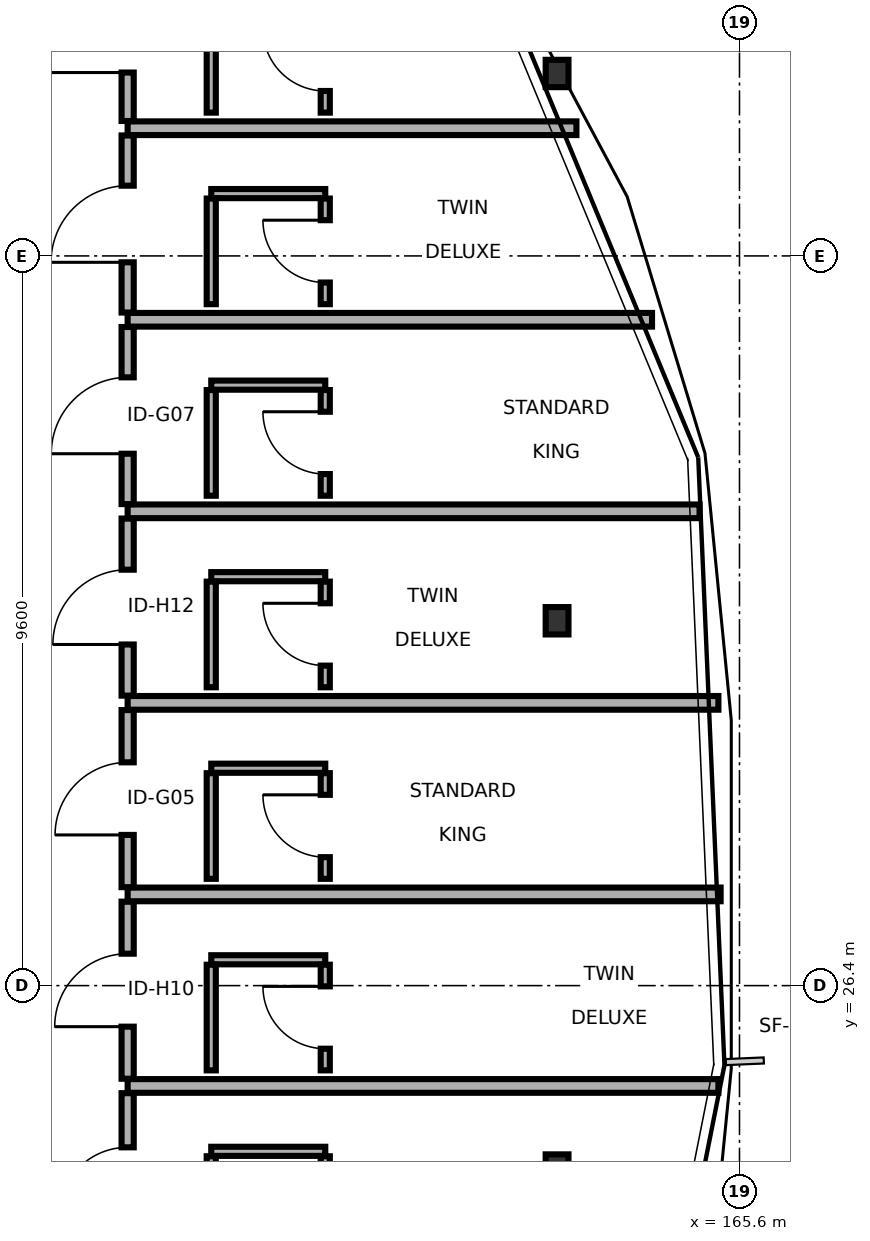
"""IFC4 building model, lengths in metres.
Left out: names, types, materials, properties, quantities, classifications, styles, units other than length and angle.
Written with IfcOpenShell. Run it as: python <this file> out.ifc"""

import sys

from ifc_helpers import new_model, si_unit, direction, frame, frame_2d, origin, origin_2d, place, context, subcontext, project, spatial, rectangle, i_section, extrude, element, fill, save


model = new_model("IFC4")
c1 = context("Model", 3, precision=1e-05, world=origin(), true_north=direction((0.0, 1.0)))
c2 = subcontext(c1, "Body", "Model", "MODEL_VIEW")
j1 = project(units=[si_unit("LENGTHUNIT", "METRE"), si_unit("PLANEANGLEUNIT", "RADIAN")], contexts=[c1])
p1 = place(None, origin())
s1 = spatial("IfcSite", under=j1, at=p1, CompositionType="ELEMENT")
p2 = place(p1, origin())
s2 = spatial("IfcBuilding", under=s1, at=p2, CompositionType="ELEMENT")
p3 = place(p2, frame((0.0, 0.0, 35.1)))
s3 = spatial("IfcBuildingStorey", under=s2, at=p3, CompositionType="ELEMENT", Elevation=35.1)
for number, where, z_axis, x_axis in (
    (1, (163.2, 24.0, 0.0), (0.0, 0.0, 1.0), (1.0, 0.0, 0.0)),
    (2, (163.2, 31.2, 0.0), (0.0, 0.0, 1.0), (1.0, 0.0, 0.0)),
    (3, (163.2, 38.4, 0.0), (0.0, 0.0, 1.0), (1.0, 0.0, 0.0)),
):
    element("IfcColumn", number, at=place(p3, frame(where, z_axis=z_axis, x_axis=x_axis)), inside=s3, PredefinedType="COLUMN", context=c2, shape_type="SweptSolid", body=[
        extrude(i_section(OverallWidth=0.3, OverallDepth=0.36, WebThickness=0.012, FlangeThickness=0.022, FilletRadius=0.027, at=origin_2d()), origin(), (0.0, 0.0, 1.0), 3.4),
    ])
p4 = place(p3, frame((157.55, 22.655, 0.0), z_axis=(0.0, 0.0, 1.0), x_axis=(0.0, 1.0, 0.0)))
e4 = element("IfcWall", 4, at=p4, inside=s3, PredefinedType="PARTITIONING", context=c2, shape_type="SweptSolid", body=[
    extrude(rectangle(XDim=2.33, YDim=0.16, at=frame_2d((1.165, 0.0))), origin(), (0.0, 0.0, 1.0), 2.75),
])
p5 = place(p4, frame((0.712, 0.0, 0.0)))
e5 = element("IfcOpeningElement", 5, at=p5, cuts=e4, PredefinedType="OPENING", context=c2, shape_type="SweptSolid", body=[
    extrude(rectangle(XDim=0.905, YDim=2.05, at=frame_2d((0.453, 1.025))), frame((0.0, 0.09, 0.0), z_axis=(0.0, -1.0, 0.0), x_axis=(1.0, 0.0, 0.0)), (0.0, 0.0, 1.0), 0.18),
])
p6 = place(p3, frame((158.65, 24.22, 0.0), z_axis=(0.0, 0.0, 1.0), x_axis=(1.0, 0.0, 0.0)))
e6 = element("IfcWall", 6, at=p6, inside=s3, PredefinedType="PARTITIONING", context=c2, shape_type="SweptSolid", body=[
    extrude(rectangle(XDim=1.5, YDim=0.12, at=frame_2d((0.75, 0.0))), origin(), (0.0, 0.0, 1.0), 2.75),
])
p7 = place(p3, frame((158.65, 22.765, 0.0), z_axis=(0.0, 0.0, 1.0), x_axis=(0.0, 1.0, 0.0)))
e7 = element("IfcWall", 7, at=p7, inside=s3, PredefinedType="PARTITIONING", context=c2, shape_type="SweptSolid", body=[
    extrude(rectangle(XDim=1.39, YDim=0.12, at=frame_2d((0.695, 0.0))), origin(), (0.0, 0.0, 1.0), 2.75),
])
p8 = place(p3, frame((160.15, 22.765, 0.0), z_axis=(0.0, 0.0, 1.0), x_axis=(0.0, 1.0, 0.0)))
e8 = element("IfcWall", 8, at=p8, inside=s3, PredefinedType="PARTITIONING", context=c2, shape_type="SweptSolid", body=[
    extrude(rectangle(XDim=1.39, YDim=0.12, at=frame_2d((0.695, 0.0))), origin(), (0.0, 0.0, 1.0), 2.75),
])
p9 = place(p8, frame((0.285, 0.0, 0.0)))
e9 = element("IfcOpeningElement", 9, at=p9, cuts=e8, PredefinedType="OPENING", context=c2, shape_type="SweptSolid", body=[
    extrude(rectangle(XDim=0.82, YDim=2.08, at=frame_2d((0.41, 1.04))), frame((0.0, 0.07, 0.0), z_axis=(0.0, -1.0, 0.0), x_axis=(1.0, 0.0, 0.0)), (0.0, 0.0, 1.0), 0.14),
])
p10 = place(p3, frame((157.55, 25.08, 0.0), z_axis=(0.0, 0.0, 1.0), x_axis=(1.0, 0.0, 0.0)))
e10 = element("IfcWall", 10, at=p10, inside=s3, PredefinedType="PARTITIONING", context=c2, shape_type="SweptSolid", body=[
    extrude(rectangle(XDim=7.773, YDim=0.18, at=frame_2d((3.886, 0.0))), origin(), (0.0, 0.0, 1.0), 2.65),
])
p11 = place(p3, frame((157.55, 25.175, 0.0), z_axis=(0.0, 0.0, 1.0), x_axis=(0.0, 1.0, 0.0)))
e11 = element("IfcWall", 11, at=p11, inside=s3, PredefinedType="PARTITIONING", context=c2, shape_type="SweptSolid", body=[
    extrude(rectangle(XDim=2.33, YDim=0.16, at=frame_2d((1.165, 0.0))), origin(), (0.0, 0.0, 1.0), 3.165),
])
p12 = place(p11, frame((0.685, 0.0, 0.0)))
e12 = element("IfcOpeningElement", 12, at=p12, cuts=e11, PredefinedType="OPENING", context=c2, shape_type="SweptSolid", body=[
    extrude(rectangle(XDim=0.96, YDim=2.13, at=frame_2d((0.48, 1.065))), frame((0.0, 0.09, 0.0), z_axis=(0.0, -1.0, 0.0), x_axis=(1.0, 0.0, 0.0)), (0.0, 0.0, 1.0), 0.18),
])
p13 = place(p3, frame((158.65, 26.74, 0.0), z_axis=(0.0, 0.0, 1.0), x_axis=(1.0, 0.0, 0.0)))
e13 = element("IfcWall", 13, at=p13, inside=s3, PredefinedType="PARTITIONING", context=c2, shape_type="SweptSolid", body=[
    extrude(rectangle(XDim=1.5, YDim=0.12, at=frame_2d((0.75, 0.0))), origin(), (0.0, 0.0, 1.0), 3.165),
])
p14 = place(p3, frame((158.65, 25.285, 0.0), z_axis=(0.0, 0.0, 1.0), x_axis=(0.0, 1.0, 0.0)))
e14 = element("IfcWall", 14, at=p14, inside=s3, PredefinedType="PARTITIONING", context=c2, shape_type="SweptSolid", body=[
    extrude(rectangle(XDim=1.39, YDim=0.12, at=frame_2d((0.695, 0.0))), origin(), (0.0, 0.0, 1.0), 3.165),
])
p15 = place(p3, frame((160.15, 25.285, 0.0), z_axis=(0.0, 0.0, 1.0), x_axis=(0.0, 1.0, 0.0)))
e15 = element("IfcWall", 15, at=p15, inside=s3, PredefinedType="PARTITIONING", context=c2, shape_type="SweptSolid", body=[
    extrude(rectangle(XDim=1.39, YDim=0.12, at=frame_2d((0.695, 0.0))), origin(), (0.0, 0.0, 1.0), 3.165),
])
p16 = place(p15, frame((0.285, 0.0, 0.0)))
e16 = element("IfcOpeningElement", 16, at=p16, cuts=e15, PredefinedType="OPENING", context=c2, shape_type="SweptSolid", body=[
    extrude(rectangle(XDim=0.82, YDim=2.08, at=frame_2d((0.41, 1.04))), frame((0.0, 0.07, 0.0), z_axis=(0.0, -1.0, 0.0), x_axis=(1.0, 0.0, 0.0)), (0.0, 0.0, 1.0), 0.14),
])
p17 = place(p3, frame((157.55, 27.6, 0.0), z_axis=(0.0, 0.0, 1.0), x_axis=(1.0, 0.0, 0.0)))
e17 = element("IfcWall", 17, at=p17, inside=s3, PredefinedType="PARTITIONING", context=c2, shape_type="SweptSolid", body=[
    extrude(rectangle(XDim=7.802, YDim=0.18, at=frame_2d((3.901, 0.0))), origin(), (0.0, 0.0, 1.0), 2.65),
])
p18 = place(p3, frame((157.55, 27.695, 0.0), z_axis=(0.0, 0.0, 1.0), x_axis=(0.0, 1.0, 0.0)))
e18 = element("IfcWall", 18, at=p18, inside=s3, PredefinedType="PARTITIONING", context=c2, shape_type="SweptSolid", body=[
    extrude(rectangle(XDim=2.33, YDim=0.16, at=frame_2d((1.165, 0.0))), origin(), (0.0, 0.0, 1.0), 3.165),
])
p19 = place(p18, frame((0.688, 0.0, 0.0)))
e19 = element("IfcOpeningElement", 19, at=p19, cuts=e18, PredefinedType="OPENING", context=c2, shape_type="SweptSolid", body=[
    extrude(rectangle(XDim=0.955, YDim=2.05, at=frame_2d((0.478, 1.025))), frame((0.0, 0.09, 0.0), z_axis=(0.0, -1.0, 0.0), x_axis=(1.0, 0.0, 0.0)), (0.0, 0.0, 1.0), 0.18),
])
p20 = place(p3, frame((158.65, 29.26, 0.0), z_axis=(0.0, 0.0, 1.0), x_axis=(1.0, 0.0, 0.0)))
e20 = element("IfcWall", 20, at=p20, inside=s3, PredefinedType="PARTITIONING", context=c2, shape_type="SweptSolid", body=[
    extrude(rectangle(XDim=1.5, YDim=0.12, at=frame_2d((0.75, 0.0))), origin(), (0.0, 0.0, 1.0), 3.165),
])
p21 = place(p3, frame((158.65, 27.805, 0.0), z_axis=(0.0, 0.0, 1.0), x_axis=(0.0, 1.0, 0.0)))
e21 = element("IfcWall", 21, at=p21, inside=s3, PredefinedType="PARTITIONING", context=c2, shape_type="SweptSolid", body=[
    extrude(rectangle(XDim=1.39, YDim=0.12, at=frame_2d((0.695, 0.0))), origin(), (0.0, 0.0, 1.0), 3.165),
])
p22 = place(p3, frame((160.15, 27.805, 0.0), z_axis=(0.0, 0.0, 1.0), x_axis=(0.0, 1.0, 0.0)))
e22 = element("IfcWall", 22, at=p22, inside=s3, PredefinedType="PARTITIONING", context=c2, shape_type="SweptSolid", body=[
    extrude(rectangle(XDim=1.39, YDim=0.12, at=frame_2d((0.695, 0.0))), origin(), (0.0, 0.0, 1.0), 3.165),
])
p23 = place(p22, frame((0.285, 0.0, 0.0)))
e23 = element("IfcOpeningElement", 23, at=p23, cuts=e22, PredefinedType="OPENING", context=c2, shape_type="SweptSolid", body=[
    extrude(rectangle(XDim=0.82, YDim=2.08, at=frame_2d((0.41, 1.04))), frame((0.0, 0.07, 0.0), z_axis=(0.0, -1.0, 0.0), x_axis=(1.0, 0.0, 0.0)), (0.0, 0.0, 1.0), 0.14),
])
p24 = place(p3, frame((157.55, 30.12, 0.0), z_axis=(0.0, 0.0, 1.0), x_axis=(1.0, 0.0, 0.0)))
e24 = element("IfcWall", 24, at=p24, inside=s3, PredefinedType="PARTITIONING", context=c2, shape_type="SweptSolid", body=[
    extrude(rectangle(XDim=7.773, YDim=0.18, at=frame_2d((3.886, 0.0))), origin(), (0.0, 0.0, 1.0), 2.65),
])
p25 = place(p3, frame((157.55, 30.215, 0.0), z_axis=(0.0, 0.0, 1.0), x_axis=(0.0, 1.0, 0.0)))
e25 = element("IfcWall", 25, at=p25, inside=s3, PredefinedType="PARTITIONING", context=c2, shape_type="SweptSolid", body=[
    extrude(rectangle(XDim=2.33, YDim=0.16, at=frame_2d((1.165, 0.0))), origin(), (0.0, 0.0, 1.0), 2.75),
])
p26 = place(p25, frame((0.673, 0.0, 0.0)))
e26 = element("IfcOpeningElement", 26, at=p26, cuts=e25, PredefinedType="OPENING", context=c2, shape_type="SweptSolid", body=[
    extrude(rectangle(XDim=0.984, YDim=2.07, at=frame_2d((0.492, 1.035))), frame((0.0, 0.09, 0.0), z_axis=(0.0, -1.0, 0.0), x_axis=(1.0, 0.0, 0.0)), (0.0, 0.0, 1.0), 0.18),
])
p27 = place(p3, frame((158.65, 31.78, 0.0), z_axis=(0.0, 0.0, 1.0), x_axis=(1.0, 0.0, 0.0)))
e27 = element("IfcWall", 27, at=p27, inside=s3, PredefinedType="PARTITIONING", context=c2, shape_type="SweptSolid", body=[
    extrude(rectangle(XDim=1.5, YDim=0.12, at=frame_2d((0.75, 0.0))), origin(), (0.0, 0.0, 1.0), 3.165),
])
p28 = place(p3, frame((158.65, 30.325, 0.0), z_axis=(0.0, 0.0, 1.0), x_axis=(0.0, 1.0, 0.0)))
e28 = element("IfcWall", 28, at=p28, inside=s3, PredefinedType="PARTITIONING", context=c2, shape_type="SweptSolid", body=[
    extrude(rectangle(XDim=1.39, YDim=0.12, at=frame_2d((0.695, 0.0))), origin(), (0.0, 0.0, 1.0), 2.75),
])
p29 = place(p3, frame((160.15, 30.325, 0.0), z_axis=(0.0, 0.0, 1.0), x_axis=(0.0, 1.0, 0.0)))
e29 = element("IfcWall", 29, at=p29, inside=s3, PredefinedType="PARTITIONING", context=c2, shape_type="SweptSolid", body=[
    extrude(rectangle(XDim=1.39, YDim=0.12, at=frame_2d((0.695, 0.0))), origin(), (0.0, 0.0, 1.0), 2.75),
])
p30 = place(p29, frame((0.285, 0.0, 0.0)))
e30 = element("IfcOpeningElement", 30, at=p30, cuts=e29, PredefinedType="OPENING", context=c2, shape_type="SweptSolid", body=[
    extrude(rectangle(XDim=0.82, YDim=2.08, at=frame_2d((0.41, 1.04))), frame((0.0, 0.07, 0.0), z_axis=(0.0, -1.0, 0.0), x_axis=(1.0, 0.0, 0.0)), (0.0, 0.0, 1.0), 0.14),
])
p31 = place(p3, frame((157.55, 32.64, 0.0), z_axis=(0.0, 0.0, 1.0), x_axis=(1.0, 0.0, 0.0)))
e31 = element("IfcWall", 31, at=p31, inside=s3, PredefinedType="PARTITIONING", context=c2, shape_type="SweptSolid", body=[
    extrude(rectangle(XDim=7.524, YDim=0.18, at=frame_2d((3.762, 0.0))), origin(), (0.0, 0.0, 1.0), 2.65),
])
p32 = place(p3, frame((157.55, 32.735, 0.0), z_axis=(0.0, 0.0, 1.0), x_axis=(0.0, 1.0, 0.0)))
e32 = element("IfcWall", 32, at=p32, inside=s3, PredefinedType="PARTITIONING", context=c2, shape_type="SweptSolid", body=[
    extrude(rectangle(XDim=2.33, YDim=0.16, at=frame_2d((1.165, 0.0))), origin(), (0.0, 0.0, 1.0), 3.165),
])
p33 = place(p32, frame((0.663, 0.0, 0.0)))
e33 = element("IfcOpeningElement", 33, at=p33, cuts=e32, PredefinedType="OPENING", context=c2, shape_type="SweptSolid", body=[
    extrude(rectangle(XDim=1.005, YDim=2.05, at=frame_2d((0.502, 1.025))), frame((0.0, 0.09, 0.0), z_axis=(0.0, -1.0, 0.0), x_axis=(1.0, 0.0, 0.0)), (0.0, 0.0, 1.0), 0.18),
])
p34 = place(p3, frame((158.65, 34.3, 0.0), z_axis=(0.0, 0.0, 1.0), x_axis=(1.0, 0.0, 0.0)))
e34 = element("IfcWall", 34, at=p34, inside=s3, PredefinedType="PARTITIONING", context=c2, shape_type="SweptSolid", body=[
    extrude(rectangle(XDim=1.5, YDim=0.12, at=frame_2d((0.75, 0.0))), origin(), (0.0, 0.0, 1.0), 3.165),
])
p35 = place(p3, frame((158.65, 32.845, 0.0), z_axis=(0.0, 0.0, 1.0), x_axis=(0.0, 1.0, 0.0)))
e35 = element("IfcWall", 35, at=p35, inside=s3, PredefinedType="PARTITIONING", context=c2, shape_type="SweptSolid", body=[
    extrude(rectangle(XDim=1.39, YDim=0.12, at=frame_2d((0.695, 0.0))), origin(), (0.0, 0.0, 1.0), 3.165),
])
p36 = place(p3, frame((160.15, 32.845, 0.0), z_axis=(0.0, 0.0, 1.0), x_axis=(0.0, 1.0, 0.0)))
e36 = element("IfcWall", 36, at=p36, inside=s3, PredefinedType="PARTITIONING", context=c2, shape_type="SweptSolid", body=[
    extrude(rectangle(XDim=1.39, YDim=0.12, at=frame_2d((0.695, 0.0))), origin(), (0.0, 0.0, 1.0), 3.165),
])
p37 = place(p36, frame((0.285, 0.0, 0.0)))
e37 = element("IfcOpeningElement", 37, at=p37, cuts=e36, PredefinedType="OPENING", context=c2, shape_type="SweptSolid", body=[
    extrude(rectangle(XDim=0.82, YDim=2.08, at=frame_2d((0.41, 1.04))), frame((0.0, 0.07, 0.0), z_axis=(0.0, -1.0, 0.0), x_axis=(1.0, 0.0, 0.0)), (0.0, 0.0, 1.0), 0.14),
])
p38 = place(p3, frame((157.55, 35.16, 0.0), z_axis=(0.0, 0.0, 1.0), x_axis=(1.0, 0.0, 0.0)))
e38 = element("IfcWall", 38, at=p38, inside=s3, PredefinedType="PARTITIONING", context=c2, shape_type="SweptSolid", body=[
    extrude(rectangle(XDim=6.899, YDim=0.18, at=frame_2d((3.45, 0.0))), origin(), (0.0, 0.0, 1.0), 2.65),
])
p39 = place(p3, frame((157.55, 35.255, 0.0), z_axis=(0.0, 0.0, 1.0), x_axis=(0.0, 1.0, 0.0)))
e39 = element("IfcWall", 39, at=p39, inside=s3, PredefinedType="PARTITIONING", context=c2, shape_type="SweptSolid", body=[
    extrude(rectangle(XDim=2.33, YDim=0.16, at=frame_2d((1.165, 0.0))), origin(), (0.0, 0.0, 1.0), 3.165),
])
p40 = place(p39, frame((0.661, 0.0, 0.0)))
e40 = element("IfcOpeningElement", 40, at=p40, cuts=e39, PredefinedType="OPENING", context=c2, shape_type="SweptSolid", body=[
    extrude(rectangle(XDim=1.008, YDim=2.13, at=frame_2d((0.504, 1.065))), frame((0.0, 0.09, 0.0), z_axis=(0.0, -1.0, 0.0), x_axis=(1.0, 0.0, 0.0)), (0.0, 0.0, 1.0), 0.18),
])
p41 = place(p3, frame((158.65, 36.82, 0.0), z_axis=(0.0, 0.0, 1.0), x_axis=(1.0, 0.0, 0.0)))
e41 = element("IfcWall", 41, at=p41, inside=s3, PredefinedType="PARTITIONING", context=c2, shape_type="SweptSolid", body=[
    extrude(rectangle(XDim=1.5, YDim=0.12, at=frame_2d((0.75, 0.0))), origin(), (0.0, 0.0, 1.0), 3.165),
])
p42 = place(p3, frame((158.65, 35.365, 0.0), z_axis=(0.0, 0.0, 1.0), x_axis=(0.0, 1.0, 0.0)))
e42 = element("IfcWall", 42, at=p42, inside=s3, PredefinedType="PARTITIONING", context=c2, shape_type="SweptSolid", body=[
    extrude(rectangle(XDim=1.39, YDim=0.12, at=frame_2d((0.695, 0.0))), origin(), (0.0, 0.0, 1.0), 3.165),
])
p43 = place(p3, frame((160.15, 35.365, 0.0), z_axis=(0.0, 0.0, 1.0), x_axis=(0.0, 1.0, 0.0)))
e43 = element("IfcWall", 43, at=p43, inside=s3, PredefinedType="PARTITIONING", context=c2, shape_type="SweptSolid", body=[
    extrude(rectangle(XDim=1.39, YDim=0.12, at=frame_2d((0.695, 0.0))), origin(), (0.0, 0.0, 1.0), 3.165),
])
p44 = place(p43, frame((0.285, 0.0, 0.0)))
e44 = element("IfcOpeningElement", 44, at=p44, cuts=e43, PredefinedType="OPENING", context=c2, shape_type="SweptSolid", body=[
    extrude(rectangle(XDim=0.82, YDim=2.08, at=frame_2d((0.41, 1.04))), frame((0.0, 0.07, 0.0), z_axis=(0.0, -1.0, 0.0), x_axis=(1.0, 0.0, 0.0)), (0.0, 0.0, 1.0), 0.14),
])
p45 = place(p3, frame((157.55, 37.68, 0.0), z_axis=(0.0, 0.0, 1.0), x_axis=(1.0, 0.0, 0.0)))
e45 = element("IfcWall", 45, at=p45, inside=s3, PredefinedType="PARTITIONING", context=c2, shape_type="SweptSolid", body=[
    extrude(rectangle(XDim=5.905, YDim=0.18, at=frame_2d((2.952, 0.0))), origin(), (0.0, 0.0, 1.0), 2.65),
])
p46 = place(p3, frame((157.55, 37.775, 0.0), z_axis=(0.0, 0.0, 1.0), x_axis=(0.0, 1.0, 0.0)))
e46 = element("IfcWall", 46, at=p46, inside=s3, PredefinedType="PARTITIONING", context=c2, shape_type="SweptSolid", body=[
    extrude(rectangle(XDim=2.33, YDim=0.16, at=frame_2d((1.165, 0.0))), origin(), (0.0, 0.0, 1.0), 2.75),
])
p47 = place(p46, frame((0.637, 0.0, 0.0)))
e47 = element("IfcOpeningElement", 47, at=p47, cuts=e46, PredefinedType="OPENING", context=c2, shape_type="SweptSolid", body=[
    extrude(rectangle(XDim=1.055, YDim=2.05, at=frame_2d((0.527, 1.025))), frame((0.0, 0.09, 0.0), z_axis=(0.0, -1.0, 0.0), x_axis=(1.0, 0.0, 0.0)), (0.0, 0.0, 1.0), 0.18),
])
p48 = place(p3, frame((158.65, 37.885, 0.0), z_axis=(0.0, 0.0, 1.0), x_axis=(0.0, 1.0, 0.0)))
e48 = element("IfcWall", 48, at=p48, inside=s3, PredefinedType="PARTITIONING", context=c2, shape_type="SweptSolid", body=[
    extrude(rectangle(XDim=1.39, YDim=0.12, at=frame_2d((0.695, 0.0))), origin(), (0.0, 0.0, 1.0), 2.75),
])
p49 = place(p3, frame((160.15, 37.885, 0.0), z_axis=(0.0, 0.0, 1.0), x_axis=(0.0, 1.0, 0.0)))
e49 = element("IfcWall", 49, at=p49, inside=s3, PredefinedType="PARTITIONING", context=c2, shape_type="SweptSolid", body=[
    extrude(rectangle(XDim=1.39, YDim=0.12, at=frame_2d((0.695, 0.0))), origin(), (0.0, 0.0, 1.0), 2.75),
])
p50 = place(p49, frame((0.285, 0.0, 0.0)))
e50 = element("IfcOpeningElement", 50, at=p50, cuts=e49, PredefinedType="OPENING", context=c2, shape_type="SweptSolid", body=[
    extrude(rectangle(XDim=0.82, YDim=2.08, at=frame_2d((0.41, 1.04))), frame((0.0, 0.07, 0.0), z_axis=(0.0, -1.0, 0.0), x_axis=(1.0, 0.0, 0.0)), (0.0, 0.0, 1.0), 0.14),
])
p51 = place(p5, origin())
e51 = element("IfcDoor", 51, at=p51, inside=s3, OperationType="SINGLE_SWING_LEFT", PredefinedType="DOOR", context=c2, shape_type="SweptSolid", body=[
    extrude(rectangle(XDim=0.905, YDim=2.05, at=frame_2d((0.453, 1.025))), frame((0.0, 0.025, 0.0), z_axis=(0.0, -1.0, 0.0), x_axis=(1.0, 0.0, 0.0)), (0.0, 0.0, 1.0), 0.05),
])
fill(e5, e51)
p52 = place(p12, origin())
e52 = element("IfcDoor", 52, at=p52, inside=s3, OperationType="SINGLE_SWING_LEFT", PredefinedType="DOOR", context=c2, shape_type="SweptSolid", body=[
    extrude(rectangle(XDim=0.96, YDim=2.13, at=frame_2d((0.48, 1.065))), frame((0.0, 0.025, 0.0), z_axis=(0.0, -1.0, 0.0), x_axis=(1.0, 0.0, 0.0)), (0.0, 0.0, 1.0), 0.05),
])
fill(e12, e52)
p53 = place(p16, origin())
e53 = element("IfcDoor", 53, at=p53, inside=s3, OperationType="SINGLE_SWING_RIGHT", PredefinedType="DOOR", context=c2, shape_type="SweptSolid", body=[
    extrude(rectangle(XDim=0.82, YDim=2.08, at=frame_2d((0.41, 1.04))), frame((0.0, 0.025, 0.0), z_axis=(0.0, -1.0, 0.0), x_axis=(1.0, 0.0, 0.0)), (0.0, 0.0, 1.0), 0.05),
])
fill(e16, e53)
p54 = place(p19, origin())
e54 = element("IfcDoor", 54, at=p54, inside=s3, OperationType="SINGLE_SWING_LEFT", PredefinedType="DOOR", context=c2, shape_type="SweptSolid", body=[
    extrude(rectangle(XDim=0.955, YDim=2.05, at=frame_2d((0.478, 1.025))), frame((0.0, 0.025, 0.0), z_axis=(0.0, -1.0, 0.0), x_axis=(1.0, 0.0, 0.0)), (0.0, 0.0, 1.0), 0.05),
])
fill(e19, e54)
p55 = place(p23, origin())
e55 = element("IfcDoor", 55, at=p55, inside=s3, OperationType="SINGLE_SWING_RIGHT", PredefinedType="DOOR", context=c2, shape_type="SweptSolid", body=[
    extrude(rectangle(XDim=0.82, YDim=2.08, at=frame_2d((0.41, 1.04))), frame((0.0, 0.025, 0.0), z_axis=(0.0, -1.0, 0.0), x_axis=(1.0, 0.0, 0.0)), (0.0, 0.0, 1.0), 0.05),
])
fill(e23, e55)
p56 = place(p26, origin())
e56 = element("IfcDoor", 56, at=p56, inside=s3, OperationType="SINGLE_SWING_LEFT", PredefinedType="DOOR", context=c2, shape_type="SweptSolid", body=[
    extrude(rectangle(XDim=0.984, YDim=2.07, at=frame_2d((0.492, 1.035))), frame((0.0, 0.025, 0.0), z_axis=(0.0, -1.0, 0.0), x_axis=(1.0, 0.0, 0.0)), (0.0, 0.0, 1.0), 0.05),
])
fill(e26, e56)
p57 = place(p30, origin())
e57 = element("IfcDoor", 57, at=p57, inside=s3, OperationType="SINGLE_SWING_RIGHT", PredefinedType="DOOR", context=c2, shape_type="SweptSolid", body=[
    extrude(rectangle(XDim=0.82, YDim=2.08, at=frame_2d((0.41, 1.04))), frame((0.0, 0.025, 0.0), z_axis=(0.0, -1.0, 0.0), x_axis=(1.0, 0.0, 0.0)), (0.0, 0.0, 1.0), 0.05),
])
fill(e30, e57)
p58 = place(p33, origin())
e58 = element("IfcDoor", 58, at=p58, inside=s3, OperationType="SINGLE_SWING_LEFT", PredefinedType="DOOR", context=c2, shape_type="SweptSolid", body=[
    extrude(rectangle(XDim=1.005, YDim=2.05, at=frame_2d((0.502, 1.025))), frame((0.0, 0.025, 0.0), z_axis=(0.0, -1.0, 0.0), x_axis=(1.0, 0.0, 0.0)), (0.0, 0.0, 1.0), 0.05),
])
fill(e33, e58)
p59 = place(p37, origin())
e59 = element("IfcDoor", 59, at=p59, inside=s3, OperationType="SINGLE_SWING_RIGHT", PredefinedType="DOOR", context=c2, shape_type="SweptSolid", body=[
    extrude(rectangle(XDim=0.82, YDim=2.08, at=frame_2d((0.41, 1.04))), frame((0.0, 0.025, 0.0), z_axis=(0.0, -1.0, 0.0), x_axis=(1.0, 0.0, 0.0)), (0.0, 0.0, 1.0), 0.05),
])
fill(e37, e59)
p60 = place(p40, origin())
e60 = element("IfcDoor", 60, at=p60, inside=s3, OperationType="SINGLE_SWING_LEFT", PredefinedType="DOOR", context=c2, shape_type="SweptSolid", body=[
    extrude(rectangle(XDim=1.008, YDim=2.13, at=frame_2d((0.504, 1.065))), frame((0.0, 0.025, 0.0), z_axis=(0.0, -1.0, 0.0), x_axis=(1.0, 0.0, 0.0)), (0.0, 0.0, 1.0), 0.05),
])
fill(e40, e60)
p61 = place(p44, origin())
e61 = element("IfcDoor", 61, at=p61, inside=s3, OperationType="SINGLE_SWING_RIGHT", PredefinedType="DOOR", context=c2, shape_type="SweptSolid", body=[
    extrude(rectangle(XDim=0.82, YDim=2.08, at=frame_2d((0.41, 1.04))), frame((0.0, 0.025, 0.0), z_axis=(0.0, -1.0, 0.0), x_axis=(1.0, 0.0, 0.0)), (0.0, 0.0, 1.0), 0.05),
])
fill(e44, e61)
p62 = place(p47, origin())
e62 = element("IfcDoor", 62, at=p62, inside=s3, OperationType="SINGLE_SWING_LEFT", PredefinedType="DOOR", context=c2, shape_type="SweptSolid", body=[
    extrude(rectangle(XDim=1.055, YDim=2.05, at=frame_2d((0.527, 1.025))), frame((0.0, 0.025, 0.0), z_axis=(0.0, -1.0, 0.0), x_axis=(1.0, 0.0, 0.0)), (0.0, 0.0, 1.0), 0.05),
])
fill(e47, e62)
p63 = place(p50, origin())
e63 = element("IfcDoor", 63, at=p63, inside=s3, OperationType="SINGLE_SWING_RIGHT", PredefinedType="DOOR", context=c2, shape_type="SweptSolid", body=[
    extrude(rectangle(XDim=0.82, YDim=2.08, at=frame_2d((0.41, 1.04))), frame((0.0, 0.025, 0.0), z_axis=(0.0, -1.0, 0.0), x_axis=(1.0, 0.0, 0.0)), (0.0, 0.0, 1.0), 0.05),
])
fill(e50, e63)
save(model, sys.argv[1])
